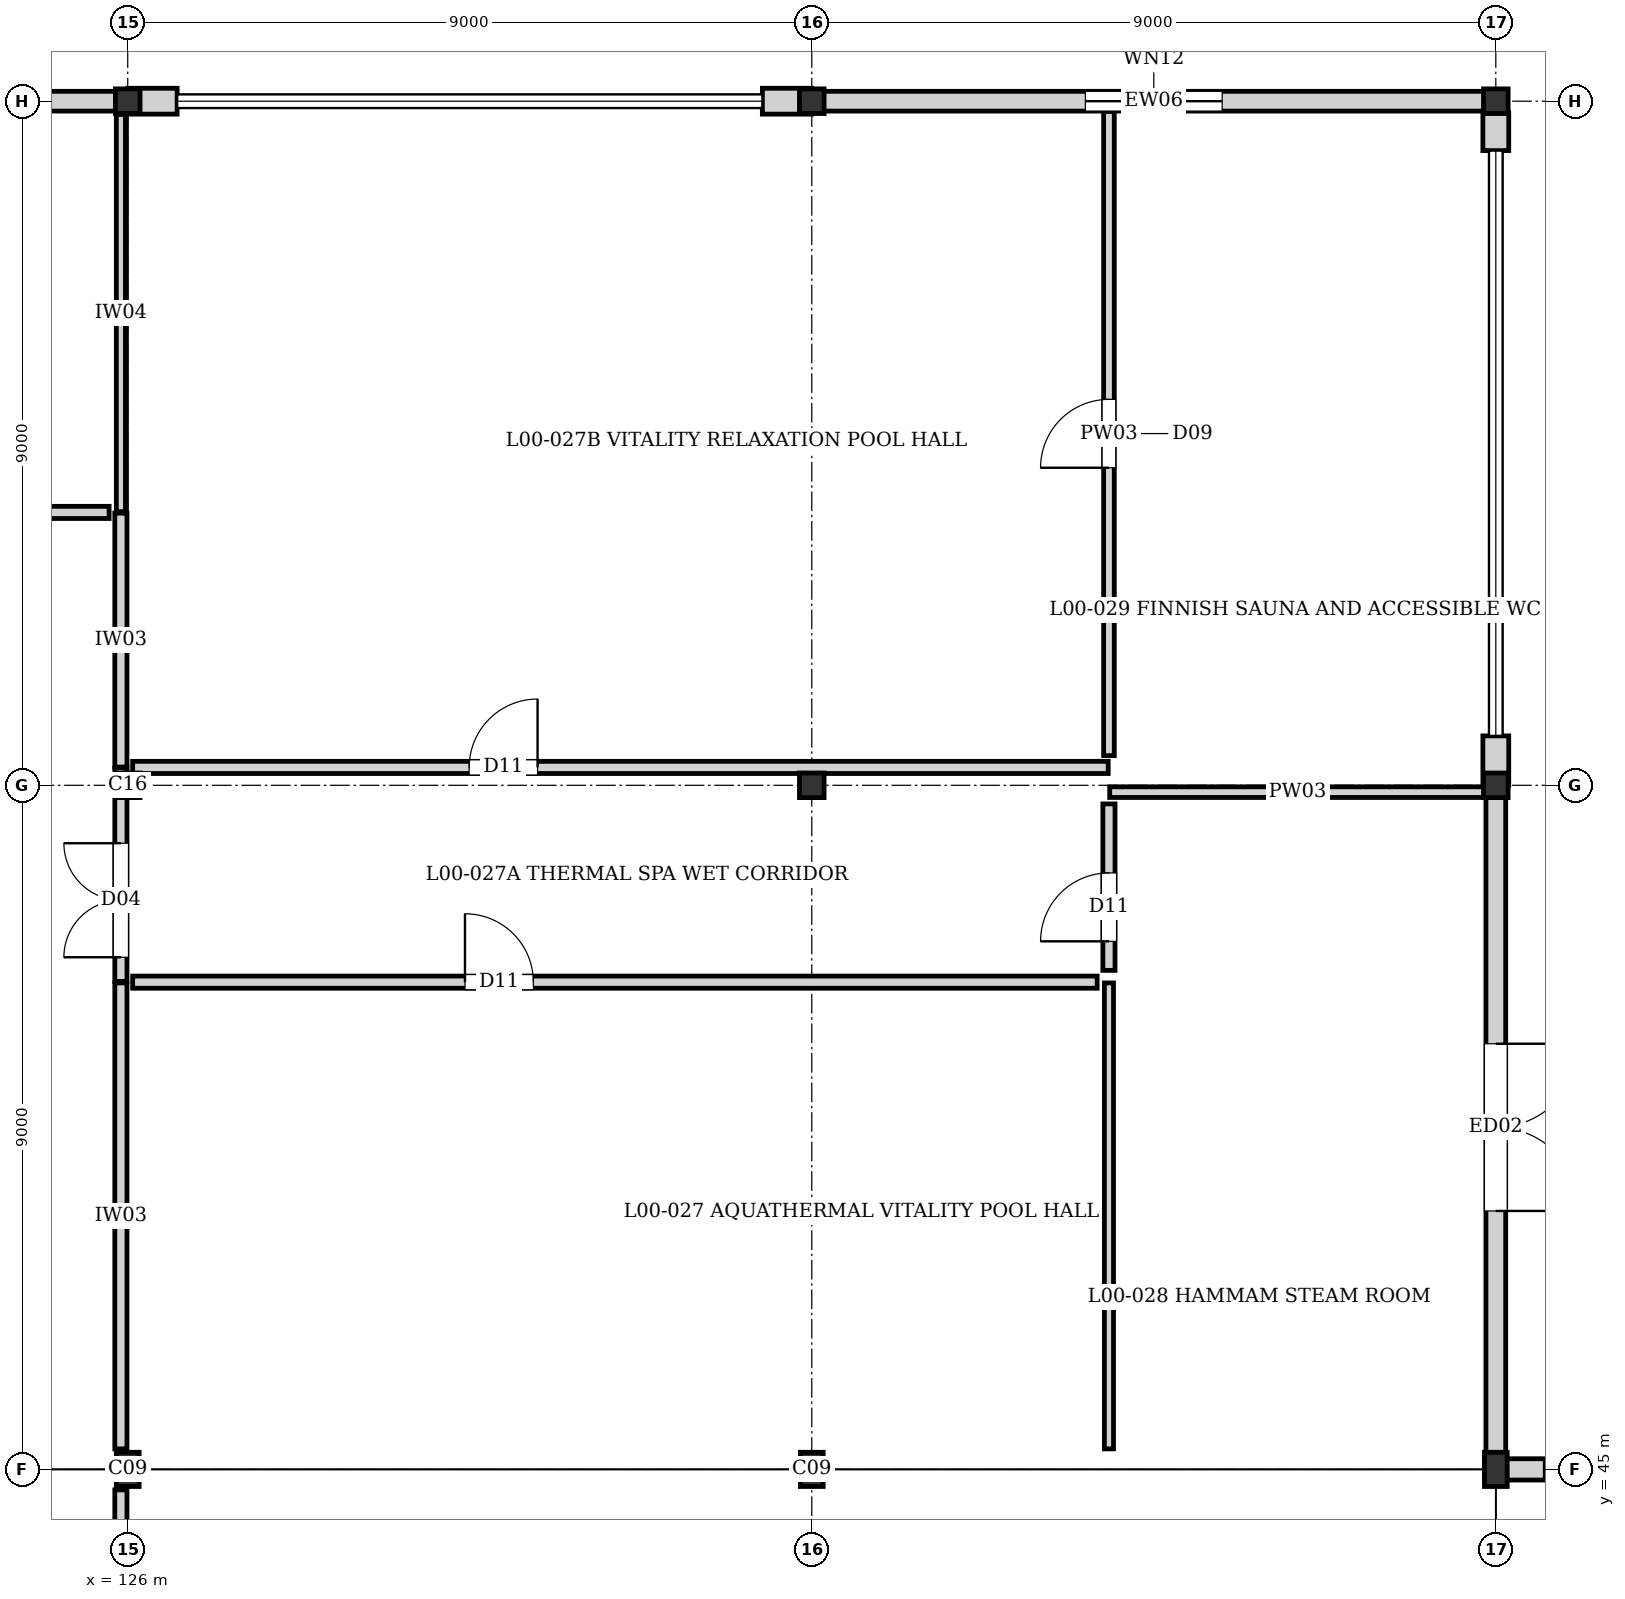
"""IFC4 building model, lengths in metres.
Left out: names, types, materials, properties, quantities, classifications, styles, units other than length and angle.
Written with IfcOpenShell. Run it as: python <this file> out.ifc"""

import sys

from ifc_helpers import new_model, si_unit, direction, frame, frame_2d, origin, origin_2d, place, context, subcontext, project, spatial, rectangle, hollow_circle, i_section, extrude, element, fill, save


model = new_model("IFC4")
c1 = context("Model", 3, precision=1e-05, world=origin(), true_north=direction((0.0, 1.0)))
c2 = subcontext(c1, "Body", "Model", "MODEL_VIEW")
j1 = project(units=[si_unit("LENGTHUNIT", "METRE"), si_unit("PLANEANGLEUNIT", "RADIAN")], contexts=[c1])
p1 = place(None, origin())
s1 = spatial("IfcSite", under=j1, at=p1, CompositionType="ELEMENT")
p2 = place(p1, origin())
s2 = spatial("IfcBuilding", under=s1, at=p2, CompositionType="ELEMENT")
p3 = place(p2, origin())
s3 = spatial("IfcBuildingStorey", under=s2, at=p3, CompositionType="ELEMENT", Elevation=0.0)
p4 = place(p3, frame((126.0, 45.0, 0.0), z_axis=(0.0, 0.0, 1.0), x_axis=(1.0, 0.0, 0.0)))
e1 = element("IfcColumn", 1, at=p4, inside=s3, PredefinedType="COLUMN", context=c2, shape_type="SweptSolid", body=[
    extrude(i_section(OverallWidth=0.3, OverallDepth=0.45, WebThickness=0.014, FlangeThickness=0.026, at=origin_2d()), origin(), (0.0, 0.0, 1.0), 4.32),
])
for number, where, z_axis, x_axis in (
    (2, (126.0, 54.0, 0.0), (0.0, 0.0, 1.0), (1.0, 0.0, 0.0)),
    (3, (126.0, 63.0, 0.0), (0.0, 0.0, 1.0), (1.0, 0.0, 0.0)),
):
    element("IfcColumn", number, at=place(p3, frame(where, z_axis=z_axis, x_axis=x_axis)), inside=s3, PredefinedType="COLUMN", context=c2, shape_type="SweptSolid", body=[
        extrude(hollow_circle(Radius=0.162, WallThickness=0.016, at=origin_2d()), origin(), (0.0, 0.0, 1.0), 4.32),
    ])
p5 = place(p3, frame((135.0, 45.0, 0.0), z_axis=(0.0, 0.0, 1.0), x_axis=(1.0, 0.0, 0.0)))
e4 = element("IfcColumn", 4, at=p5, inside=s3, PredefinedType="COLUMN", context=c2, shape_type="SweptSolid", body=[
    extrude(i_section(OverallWidth=0.3, OverallDepth=0.45, WebThickness=0.014, FlangeThickness=0.026, at=origin_2d()), origin(), (0.0, 0.0, 1.0), 4.32),
])
for number, where, z_axis, x_axis in (
    (5, (135.0, 54.0, 0.0), (0.0, 0.0, 1.0), (1.0, 0.0, 0.0)),
    (6, (135.0, 63.0, 0.0), (0.0, 0.0, 1.0), (1.0, 0.0, 0.0)),
):
    element("IfcColumn", number, at=place(p3, frame(where, z_axis=z_axis, x_axis=x_axis)), inside=s3, PredefinedType="COLUMN", context=c2, shape_type="SweptSolid", body=[
        extrude(hollow_circle(Radius=0.162, WallThickness=0.016, at=origin_2d()), origin(), (0.0, 0.0, 1.0), 4.32),
    ])
p6 = place(p3, frame((144.0, 45.0, 0.0), z_axis=(0.0, 0.0, 1.0), x_axis=(1.0, 0.0, 0.0)))
e7 = element("IfcColumn", 7, at=p6, inside=s3, PredefinedType="COLUMN", context=c2, shape_type="SweptSolid", body=[
    extrude(i_section(OverallWidth=0.3, OverallDepth=0.45, WebThickness=0.014, FlangeThickness=0.026, at=origin_2d()), origin(), (0.0, 0.0, 1.0), 4.32),
])
for number, where, z_axis, x_axis in (
    (8, (144.0, 54.0, 0.0), (0.0, 0.0, 1.0), (1.0, 0.0, 0.0)),
    (9, (144.0, 63.0, 0.0), (0.0, 0.0, 1.0), (1.0, 0.0, 0.0)),
):
    element("IfcColumn", number, at=place(p3, frame(where, z_axis=z_axis, x_axis=x_axis)), inside=s3, PredefinedType="COLUMN", context=c2, shape_type="SweptSolid", body=[
        extrude(hollow_circle(Radius=0.162, WallThickness=0.016, at=origin_2d()), origin(), (0.0, 0.0, 1.0), 4.32),
    ])
p7 = place(p3, frame((117.0, 63.0, 0.0), z_axis=(0.0, 0.0, 1.0), x_axis=(1.0, 0.0, 0.0)))
e10 = element("IfcWall", 10, at=p7, inside=s3, PredefinedType="SOLIDWALL", context=c2, shape_type="SweptSolid", body=[
    extrude(rectangle(XDim=9.0, YDim=0.26, at=frame_2d((4.5, 0.0))), origin(), (0.0, 0.0, 1.0), 3.655),
])
p8 = place(p7, frame((3.4, 0.0, 0.0)))
e11 = element("IfcOpeningElement", 11, at=p8, cuts=e10, PredefinedType="OPENING", context=c2, shape_type="SweptSolid", body=[
    extrude(rectangle(XDim=2.2, YDim=2.5, at=frame_2d((1.1, 1.25))), frame((0.0, 0.14, 0.0), z_axis=(0.0, -1.0, 0.0), x_axis=(1.0, 0.0, 0.0)), (0.0, 0.0, 1.0), 0.28),
])
for number, where, z_axis, x_axis in (
    (12, (126.0, 63.0, 0.0), (0.0, 0.0, 1.0), (1.0, 0.0, 0.0)),
    (13, (134.35, 63.0, 0.0), (0.0, 0.0, 1.0), (1.0, 0.0, 0.0)),
):
    element("IfcWall", number, at=place(p3, frame(where, z_axis=z_axis, x_axis=x_axis)), inside=s3, PredefinedType="SOLIDWALL", context=c2, shape_type="SweptSolid", body=[
        extrude(rectangle(XDim=0.65, YDim=0.34, at=frame_2d((0.325, 0.0))), origin(), (0.0, 0.0, 1.0), 3.825),
    ])
p9 = place(p3, frame((135.0, 63.0, 0.0), z_axis=(0.0, 0.0, 1.0), x_axis=(1.0, 0.0, 0.0)))
e14 = element("IfcWall", 14, at=p9, inside=s3, PredefinedType="SOLIDWALL", context=c2, shape_type="SweptSolid", body=[
    extrude(rectangle(XDim=9.0, YDim=0.26, at=frame_2d((4.5, 0.0))), origin(), (0.0, 0.0, 1.0), 3.755),
])
p10 = place(p9, frame((3.6, 0.0, 0.4)))
e15 = element("IfcOpeningElement", 15, at=p10, cuts=e14, PredefinedType="OPENING", context=c2, shape_type="SweptSolid", body=[
    extrude(rectangle(XDim=1.8, YDim=2.3, at=frame_2d((0.9, 1.15))), frame((0.0, 0.14, 0.0), z_axis=(0.0, -1.0, 0.0), x_axis=(1.0, 0.0, 0.0)), (0.0, 0.0, 1.0), 0.28),
])
p11 = place(p3, frame((144.0, 62.845, 0.0), z_axis=(0.0, 0.0, 1.0), x_axis=(0.0, -1.0, 0.0)))
e16 = element("IfcWall", 16, at=p11, inside=s3, PredefinedType="SOLIDWALL", context=c2, shape_type="SweptSolid", body=[
    extrude(rectangle(XDim=0.495, YDim=0.34, at=frame_2d((0.248, 0.0))), origin(), (0.0, 0.0, 1.0), 4.055),
])
p12 = place(p3, frame((144.0, 54.65, 0.0), z_axis=(0.0, 0.0, 1.0), x_axis=(0.0, -1.0, 0.0)))
e17 = element("IfcWall", 17, at=p12, inside=s3, PredefinedType="SOLIDWALL", context=c2, shape_type="SweptSolid", body=[
    extrude(rectangle(XDim=0.65, YDim=0.34, at=frame_2d((0.325, 0.0))), origin(), (0.0, 0.0, 1.0), 3.615),
])
p13 = place(p3, frame((144.0, 54.0, 0.0), z_axis=(0.0, 0.0, 1.0), x_axis=(0.0, -1.0, 0.0)))
e18 = element("IfcWall", 18, at=p13, inside=s3, PredefinedType="SOLIDWALL", context=c2, shape_type="SweptSolid", body=[
    extrude(rectangle(XDim=8.845, YDim=0.26, at=frame_2d((4.422, 0.0))), origin(), (0.0, 0.0, 1.0), 3.665),
])
p14 = place(p13, frame((3.4, 0.0, 0.0)))
e19 = element("IfcOpeningElement", 19, at=p14, cuts=e18, PredefinedType="OPENING", context=c2, shape_type="SweptSolid", body=[
    extrude(rectangle(XDim=2.2, YDim=2.5, at=frame_2d((1.1, 1.25))), frame((0.0, 0.14, 0.0), z_axis=(0.0, -1.0, 0.0), x_axis=(1.0, 0.0, 0.0)), (0.0, 0.0, 1.0), 0.28),
])
p15 = place(p3, frame((144.0, 45.0, 0.0), z_axis=(0.0, 0.0, 1.0), x_axis=(1.0, 0.0, 0.0)))
e20 = element("IfcWall", 20, at=p15, inside=s3, PredefinedType="SOLIDWALL", context=c2, shape_type="SweptSolid", body=[
    extrude(rectangle(XDim=0.65, YDim=0.28, at=frame_2d((0.325, 0.0))), origin(), (0.0, 0.0, 1.0), 3.695),
])
p16 = place(p3, frame((125.91, 45.27, 0.0), z_axis=(0.0, 0.0, 1.0), x_axis=(0.0, 1.0, 0.0)))
e21 = element("IfcWall", 21, at=p16, inside=s3, PredefinedType="PARTITIONING", context=c2, shape_type="SweptSolid", body=[
    extrude(rectangle(XDim=6.13, YDim=0.16, at=frame_2d((3.065, 0.0))), origin(), (0.0, 0.0, 1.0), 3.765),
])
p17 = place(p3, frame((125.91, 54.24, 0.0), z_axis=(0.0, 0.0, 1.0), x_axis=(0.0, 1.0, 0.0)))
e22 = element("IfcWall", 22, at=p17, inside=s3, PredefinedType="PARTITIONING", context=c2, shape_type="SweptSolid", body=[
    extrude(rectangle(XDim=3.34, YDim=0.16, at=frame_2d((1.67, 0.0))), origin(), (0.0, 0.0, 1.0), 3.725),
])
p18 = place(p3, frame((125.91, 57.6, 0.0), z_axis=(0.0, 0.0, 1.0), x_axis=(0.0, 1.0, 0.0)))
e23 = element("IfcWall", 23, at=p18, inside=s3, PredefinedType="PARTITIONING", context=c2, shape_type="SweptSolid", body=[
    extrude(rectangle(XDim=5.225, YDim=0.12, at=frame_2d((2.612, 0.0))), origin(), (0.0, 0.0, 1.0), 3.725),
])
p19 = place(p3, frame((138.91, 45.27, 0.0), z_axis=(0.0, 0.0, 1.0), x_axis=(0.0, 1.0, 0.0)))
e24 = element("IfcWall", 24, at=p19, inside=s3, PredefinedType="PARTITIONING", context=c2, shape_type="SweptSolid", body=[
    extrude(rectangle(XDim=6.13, YDim=0.12, at=frame_2d((3.065, 0.0))), origin(), (0.0, 0.0, 1.0), 4.055),
])
p20 = place(p3, frame((138.92, 53.91, 0.0), z_axis=(0.0, 0.0, 1.0), x_axis=(1.0, 0.0, 0.0)))
e25 = element("IfcWall", 25, at=p20, inside=s3, PredefinedType="PLUMBINGWALL", context=c2, shape_type="SweptSolid", body=[
    extrude(rectangle(XDim=4.945, YDim=0.14, at=frame_2d((2.473, 0.0))), origin(), (0.0, 0.0, 1.0), 3.565),
])
p21 = place(p3, frame((125.91, 36.145, 0.0), z_axis=(0.0, 0.0, 1.0), x_axis=(0.0, 1.0, 0.0)))
e26 = element("IfcWall", 26, at=p21, inside=s3, PredefinedType="PARTITIONING", context=c2, shape_type="SweptSolid", body=[
    extrude(rectangle(XDim=8.585, YDim=0.16, at=frame_2d((4.292, 0.0))), origin(), (0.0, 0.0, 1.0), 3.365),
])
p22 = place(p3, frame((117.22, 57.59, 0.0), z_axis=(0.0, 0.0, 1.0), x_axis=(1.0, 0.0, 0.0)))
e27 = element("IfcWall", 27, at=p22, inside=s3, PredefinedType="PARTITIONING", context=c2, shape_type="SweptSolid", body=[
    extrude(rectangle(XDim=8.535, YDim=0.16, at=frame_2d((4.268, 0.0))), origin(), (0.0, 0.0, 1.0), 4.055),
])
p23 = place(p22, frame((3.817, 0.0, 0.0)))
e28 = element("IfcOpeningElement", 28, at=p23, cuts=e27, PredefinedType="OPENING", context=c2, shape_type="SweptSolid", body=[
    extrude(rectangle(XDim=0.9, YDim=2.2, at=frame_2d((0.45, 1.1))), frame((0.0, 0.09, 0.0), z_axis=(0.0, -1.0, 0.0), x_axis=(1.0, 0.0, 0.0)), (0.0, 0.0, 1.0), 0.18),
])
p24 = place(p3, frame((125.91, 51.42, 0.0), z_axis=(0.0, 0.0, 1.0), x_axis=(0.0, 1.0, 0.0)))
e29 = element("IfcWall", 29, at=p24, inside=s3, PredefinedType="PARTITIONING", context=c2, shape_type="SweptSolid", body=[
    extrude(rectangle(XDim=2.81, YDim=0.16, at=frame_2d((1.405, 0.0))), origin(), (0.0, 0.0, 1.0), 3.765),
])
p25 = place(p24, frame((0.318, 0.0, 0.0)))
e30 = element("IfcOpeningElement", 30, at=p25, cuts=e29, PredefinedType="OPENING", context=c2, shape_type="SweptSolid", body=[
    extrude(rectangle(XDim=1.5, YDim=2.1, at=frame_2d((0.75, 1.05))), frame((0.0, 0.09, 0.0), z_axis=(0.0, -1.0, 0.0), x_axis=(1.0, 0.0, 0.0)), (0.0, 0.0, 1.0), 0.18),
])
p26 = place(p3, frame((126.065, 51.41, 0.0), z_axis=(0.0, 0.0, 1.0), x_axis=(1.0, 0.0, 0.0)))
e31 = element("IfcWall", 31, at=p26, inside=s3, PredefinedType="PARTITIONING", context=c2, shape_type="SweptSolid", body=[
    extrude(rectangle(XDim=12.69, YDim=0.16, at=frame_2d((6.345, 0.0))), origin(), (0.0, 0.0, 1.0), 4.055),
])
p27 = place(p26, frame((4.372, 0.0, 0.0)))
e32 = element("IfcOpeningElement", 32, at=p27, cuts=e31, PredefinedType="OPENING", context=c2, shape_type="SweptSolid", body=[
    extrude(rectangle(XDim=0.9, YDim=2.2, at=frame_2d((0.45, 1.1))), frame((0.0, 0.09, 0.0), z_axis=(0.0, -1.0, 0.0), x_axis=(1.0, 0.0, 0.0)), (0.0, 0.0, 1.0), 0.18),
])
p28 = place(p3, frame((126.065, 54.235, 0.0), z_axis=(0.0, 0.0, 1.0), x_axis=(1.0, 0.0, 0.0)))
e33 = element("IfcWall", 33, at=p28, inside=s3, PredefinedType="PARTITIONING", context=c2, shape_type="SweptSolid", body=[
    extrude(rectangle(XDim=12.835, YDim=0.16, at=frame_2d((6.417, 0.0))), origin(), (0.0, 0.0, 1.0), 4.055),
])
p29 = place(p28, frame((4.427, 0.0, 0.0)))
e34 = element("IfcOpeningElement", 34, at=p29, cuts=e33, PredefinedType="OPENING", context=c2, shape_type="SweptSolid", body=[
    extrude(rectangle(XDim=0.9, YDim=2.2, at=frame_2d((0.45, 1.1))), frame((0.0, 0.09, 0.0), z_axis=(0.0, -1.0, 0.0), x_axis=(1.0, 0.0, 0.0)), (0.0, 0.0, 1.0), 0.18),
])
p30 = place(p3, frame((138.91, 51.565, 0.0), z_axis=(0.0, 0.0, 1.0), x_axis=(0.0, 1.0, 0.0)))
e35 = element("IfcWall", 35, at=p30, inside=s3, PredefinedType="PARTITIONING", context=c2, shape_type="SweptSolid", body=[
    extrude(rectangle(XDim=2.19, YDim=0.16, at=frame_2d((1.095, 0.0))), origin(), (0.0, 0.0, 1.0), 4.055),
])
p31 = place(p30, frame((0.382, 0.0, 0.0)))
e36 = element("IfcOpeningElement", 36, at=p31, cuts=e35, PredefinedType="OPENING", context=c2, shape_type="SweptSolid", body=[
    extrude(rectangle(XDim=0.9, YDim=2.2, at=frame_2d((0.45, 1.1))), frame((0.0, 0.09, 0.0), z_axis=(0.0, -1.0, 0.0), x_axis=(1.0, 0.0, 0.0)), (0.0, 0.0, 1.0), 0.18),
])
p32 = place(p3, frame((138.91, 54.39, 0.0), z_axis=(0.0, 0.0, 1.0), x_axis=(0.0, 1.0, 0.0)))
e37 = element("IfcWall", 37, at=p32, inside=s3, PredefinedType="PLUMBINGWALL", context=c2, shape_type="SweptSolid", body=[
    extrude(rectangle(XDim=8.475, YDim=0.14, at=frame_2d((4.238, 0.0))), origin(), (0.0, 0.0, 1.0), 4.055),
])
p33 = place(p32, frame((3.788, 0.0, 0.0)))
e38 = element("IfcOpeningElement", 38, at=p33, cuts=e37, PredefinedType="OPENING", context=c2, shape_type="SweptSolid", body=[
    extrude(rectangle(XDim=0.9, YDim=2.1, at=frame_2d((0.45, 1.05))), frame((0.0, 0.08, 0.0), z_axis=(0.0, -1.0, 0.0), x_axis=(1.0, 0.0, 0.0)), (0.0, 0.0, 1.0), 0.16),
])
p34 = place(p10, origin())
e39 = element("IfcWindow", 39, at=p34, inside=s3, PartitioningType="SINGLE_PANEL", PredefinedType="WINDOW", context=c2, shape_type="SweptSolid", body=[
    extrude(rectangle(XDim=1.8, YDim=2.3, at=frame_2d((0.9, 1.15))), frame((0.0, 0.03, 0.0), z_axis=(0.0, -1.0, 0.0), x_axis=(1.0, 0.0, 0.0)), (0.0, 0.0, 1.0), 0.06),
])
fill(e15, e39)
p35 = place(p14, origin())
e40 = element("IfcDoor", 40, at=p35, inside=s3, OperationType="DOUBLE_DOOR_SINGLE_SWING", PredefinedType="DOOR", context=c2, shape_type="SweptSolid", body=[
    extrude(rectangle(XDim=2.2, YDim=2.5, at=frame_2d((1.1, 1.25))), frame((0.0, 0.025, 0.0), z_axis=(0.0, -1.0, 0.0), x_axis=(1.0, 0.0, 0.0)), (0.0, 0.0, 1.0), 0.05),
])
fill(e19, e40)
p36 = place(p25, origin())
e41 = element("IfcDoor", 41, at=p36, inside=s3, OperationType="DOUBLE_DOOR_SINGLE_SWING", PredefinedType="DOOR", context=c2, shape_type="SweptSolid", body=[
    extrude(rectangle(XDim=1.5, YDim=2.1, at=frame_2d((0.75, 1.05))), frame((0.0, 0.025, 0.0), z_axis=(0.0, -1.0, 0.0), x_axis=(1.0, 0.0, 0.0)), (0.0, 0.0, 1.0), 0.05),
])
fill(e30, e41)
p37 = place(p27, origin())
e42 = element("IfcDoor", 42, at=p37, inside=s3, OperationType="SINGLE_SWING_LEFT", PredefinedType="DOOR", context=c2, shape_type="SweptSolid", body=[
    extrude(rectangle(XDim=0.9, YDim=2.2, at=frame_2d((0.45, 1.1))), frame((0.0, 0.025, 0.0), z_axis=(0.0, -1.0, 0.0), x_axis=(1.0, 0.0, 0.0)), (0.0, 0.0, 1.0), 0.05),
])
fill(e32, e42)
p38 = place(p29, origin())
e43 = element("IfcDoor", 43, at=p38, inside=s3, OperationType="SINGLE_SWING_RIGHT", PredefinedType="DOOR", context=c2, shape_type="SweptSolid", body=[
    extrude(rectangle(XDim=0.9, YDim=2.2, at=frame_2d((0.45, 1.1))), frame((0.0, 0.025, 0.0), z_axis=(0.0, -1.0, 0.0), x_axis=(1.0, 0.0, 0.0)), (0.0, 0.0, 1.0), 0.05),
])
fill(e34, e43)
p39 = place(p31, origin())
e44 = element("IfcDoor", 44, at=p39, inside=s3, OperationType="SINGLE_SWING_LEFT", PredefinedType="DOOR", context=c2, shape_type="SweptSolid", body=[
    extrude(rectangle(XDim=0.9, YDim=2.2, at=frame_2d((0.45, 1.1))), frame((0.0, 0.025, 0.0), z_axis=(0.0, -1.0, 0.0), x_axis=(1.0, 0.0, 0.0)), (0.0, 0.0, 1.0), 0.05),
])
fill(e36, e44)
p40 = place(p33, origin())
e45 = element("IfcDoor", 45, at=p40, inside=s3, OperationType="SINGLE_SWING_LEFT", PredefinedType="DOOR", context=c2, shape_type="SweptSolid", body=[
    extrude(rectangle(XDim=0.9, YDim=2.1, at=frame_2d((0.45, 1.05))), frame((0.0, 0.025, 0.0), z_axis=(0.0, -1.0, 0.0), x_axis=(1.0, 0.0, 0.0)), (0.0, 0.0, 1.0), 0.05),
])
fill(e38, e45)
save(model, sys.argv[1])
